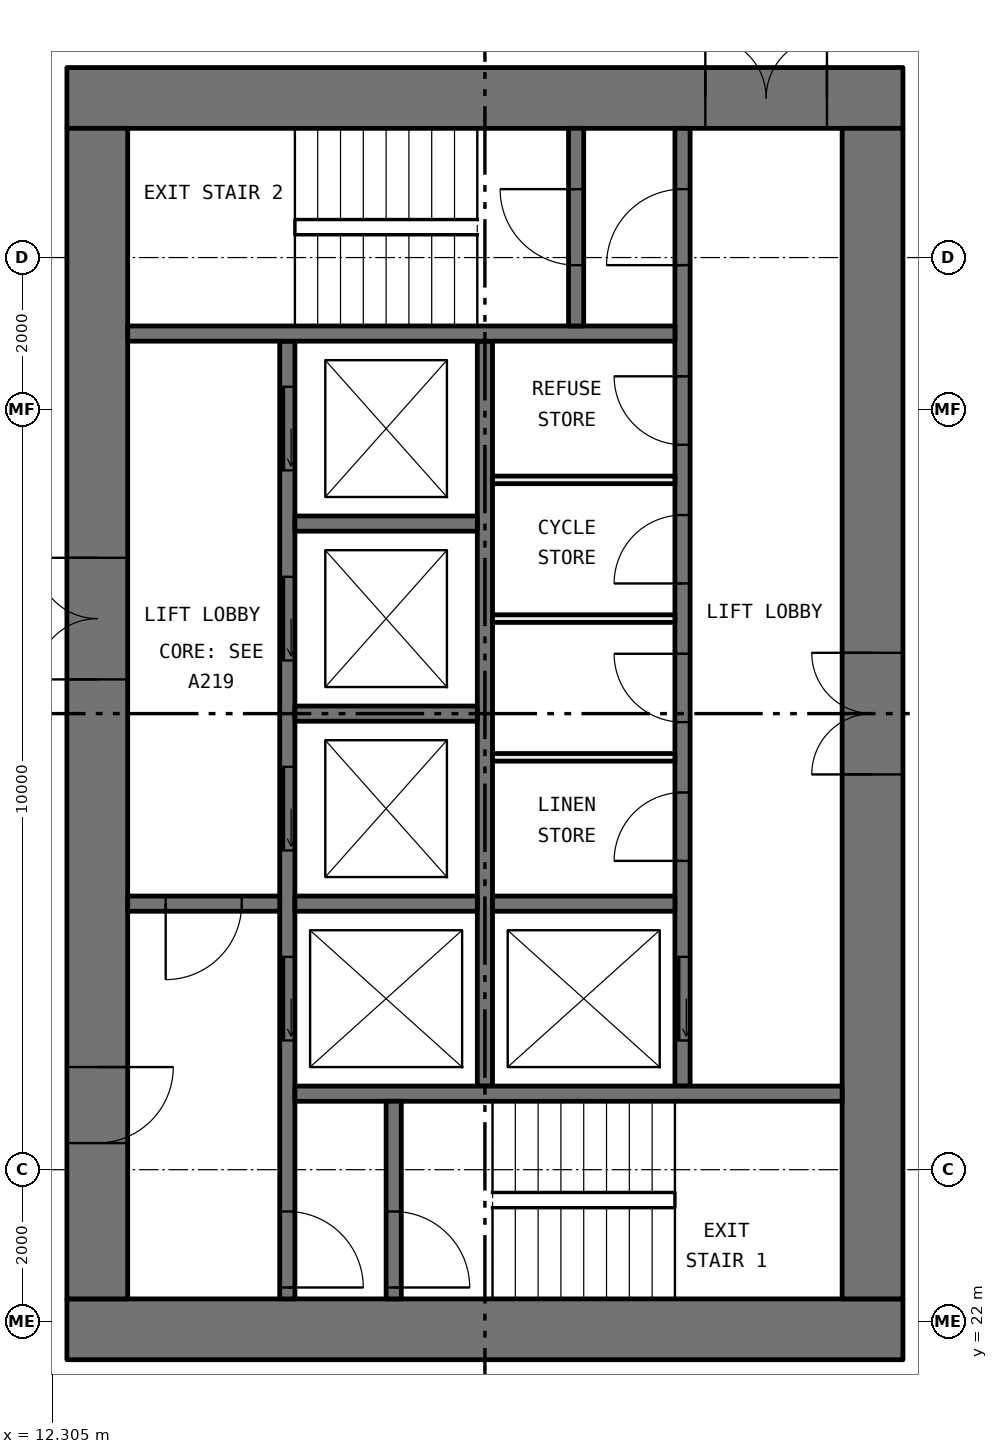
"""IFC4 building model, lengths in metres.
Left out: names, types, materials, properties, quantities, classifications, styles, units other than length and angle.
Written with IfcOpenShell. Run it as: python <this file> out.ifc"""

import sys

from ifc_helpers import new_model, si_unit, direction, frame, frame_2d, origin, place, context, subcontext, project, spatial, rectangle, extrude, element, fill, save


model = new_model("IFC4")
c1 = context("Model", 3, precision=1e-05, world=origin(), true_north=direction((0.0, 1.0)))
c2 = subcontext(c1, "Body", "Model", "MODEL_VIEW")
j1 = project(units=[si_unit("LENGTHUNIT", "METRE"), si_unit("PLANEANGLEUNIT", "RADIAN")], contexts=[c1])
p1 = place(None, origin())
s1 = spatial("IfcSite", under=j1, at=p1, CompositionType="ELEMENT")
p2 = place(p1, origin())
s2 = spatial("IfcBuilding", under=s1, at=p2, CompositionType="ELEMENT")
p3 = place(p2, frame((0.0, 0.0, 74.85)))
s3 = spatial("IfcBuildingStorey", under=s2, at=p3, CompositionType="ELEMENT", Elevation=74.85)
p4 = place(p3, frame((12.5, 21.9, 0.0), z_axis=(0.0, 0.0, 1.0), x_axis=(1.0, 0.0, 0.0)))
e1 = element("IfcWall", 1, at=p4, inside=s3, PredefinedType="SHEAR", context=c2, shape_type="SweptSolid", body=[
    extrude(rectangle(XDim=11.0, YDim=0.8, at=frame_2d((5.5, 0.0))), origin(), (0.0, 0.0, 1.0), 3.05),
])
p5 = place(p3, frame((12.5, 38.1, 0.0), z_axis=(0.0, 0.0, 1.0), x_axis=(1.0, 0.0, 0.0)))
e2 = element("IfcWall", 2, at=p5, inside=s3, PredefinedType="SHEAR", context=c2, shape_type="SweptSolid", body=[
    extrude(rectangle(XDim=11.0, YDim=0.8, at=frame_2d((5.5, 0.0))), origin(), (0.0, 0.0, 1.0), 3.05),
])
p6 = place(p5, frame((8.4, 0.0, 0.0)))
e3 = element("IfcOpeningElement", 3, at=p6, cuts=e2, PredefinedType="OPENING", context=c2, shape_type="SweptSolid", body=[
    extrude(rectangle(XDim=1.6, YDim=2.1, at=frame_2d((0.8, 1.05))), frame((0.0, 0.41, 0.0), z_axis=(0.0, -1.0, 0.0), x_axis=(1.0, 0.0, 0.0)), (0.0, 0.0, 1.0), 0.82),
])
p7 = place(p3, frame((12.9, 22.3, 0.0), z_axis=(0.0, 0.0, 1.0), x_axis=(0.0, 1.0, 0.0)))
e4 = element("IfcWall", 4, at=p7, inside=s3, PredefinedType="SHEAR", context=c2, shape_type="SweptSolid", body=[
    extrude(rectangle(XDim=15.4, YDim=0.8, at=frame_2d((7.7, 0.0))), origin(), (0.0, 0.0, 1.0), 3.05),
])
p8 = place(p7, frame((8.15, 0.0, 0.0)))
e5 = element("IfcOpeningElement", 5, at=p8, cuts=e4, PredefinedType="OPENING", context=c2, shape_type="SweptSolid", body=[
    extrude(rectangle(XDim=1.6, YDim=2.1, at=frame_2d((0.8, 1.05))), frame((0.0, 0.41, 0.0), z_axis=(0.0, -1.0, 0.0), x_axis=(1.0, 0.0, 0.0)), (0.0, 0.0, 1.0), 0.82),
])
p9 = place(p7, frame((2.05, 0.0, 0.0)))
e6 = element("IfcOpeningElement", 6, at=p9, cuts=e4, PredefinedType="OPENING", context=c2, shape_type="SweptSolid", body=[
    extrude(rectangle(XDim=1.0, YDim=2.1, at=frame_2d((0.5, 1.05))), frame((0.0, 0.41, 0.0), z_axis=(0.0, -1.0, 0.0), x_axis=(1.0, 0.0, 0.0)), (0.0, 0.0, 1.0), 0.82),
])
p10 = place(p3, frame((23.1, 22.3, 0.0), z_axis=(0.0, 0.0, 1.0), x_axis=(0.0, 1.0, 0.0)))
e7 = element("IfcWall", 7, at=p10, inside=s3, PredefinedType="SHEAR", context=c2, shape_type="SweptSolid", body=[
    extrude(rectangle(XDim=15.4, YDim=0.8, at=frame_2d((7.7, 0.0))), origin(), (0.0, 0.0, 1.0), 3.05),
])
p11 = place(p10, frame((6.9, 0.0, 0.0)))
e8 = element("IfcOpeningElement", 8, at=p11, cuts=e7, PredefinedType="OPENING", context=c2, shape_type="SweptSolid", body=[
    extrude(rectangle(XDim=1.6, YDim=2.1, at=frame_2d((0.8, 1.05))), frame((0.0, 0.41, 0.0), z_axis=(0.0, -1.0, 0.0), x_axis=(1.0, 0.0, 0.0)), (0.0, 0.0, 1.0), 0.82),
])
p12 = place(p3, frame((15.4, 22.3, 0.0), z_axis=(0.0, 0.0, 1.0), x_axis=(0.0, 1.0, 0.0)))
e9 = element("IfcWall", 9, at=p12, inside=s3, PredefinedType="SOLIDWALL", context=c2, shape_type="SweptSolid", body=[
    extrude(rectangle(XDim=12.6, YDim=0.2, at=frame_2d((6.3, 0.0))), origin(), (0.0, 0.0, 1.0), 3.05),
])
p13 = place(p12, frame((3.4, 0.0, 0.0)))
e10 = element("IfcOpeningElement", 10, at=p13, cuts=e9, PredefinedType="OPENING", context=c2, shape_type="SweptSolid", body=[
    extrude(rectangle(XDim=1.1, YDim=2.1, at=frame_2d((0.55, 1.05))), frame((0.0, 0.11, 0.0), z_axis=(0.0, -1.0, 0.0), x_axis=(1.0, 0.0, 0.0)), (0.0, 0.0, 1.0), 0.22),
])
p14 = place(p12, frame((5.9, 0.0, 0.0)))
e11 = element("IfcOpeningElement", 11, at=p14, cuts=e9, PredefinedType="OPENING", context=c2, shape_type="SweptSolid", body=[
    extrude(rectangle(XDim=1.1, YDim=2.1, at=frame_2d((0.55, 1.05))), frame((0.0, 0.11, 0.0), z_axis=(0.0, -1.0, 0.0), x_axis=(1.0, 0.0, 0.0)), (0.0, 0.0, 1.0), 0.22),
])
p15 = place(p12, frame((8.4, 0.0, 0.0)))
e12 = element("IfcOpeningElement", 12, at=p15, cuts=e9, PredefinedType="OPENING", context=c2, shape_type="SweptSolid", body=[
    extrude(rectangle(XDim=1.1, YDim=2.1, at=frame_2d((0.55, 1.05))), frame((0.0, 0.11, 0.0), z_axis=(0.0, -1.0, 0.0), x_axis=(1.0, 0.0, 0.0)), (0.0, 0.0, 1.0), 0.22),
])
p16 = place(p12, frame((10.9, 0.0, 0.0)))
e13 = element("IfcOpeningElement", 13, at=p16, cuts=e9, PredefinedType="OPENING", context=c2, shape_type="SweptSolid", body=[
    extrude(rectangle(XDim=1.1, YDim=2.1, at=frame_2d((0.55, 1.05))), frame((0.0, 0.11, 0.0), z_axis=(0.0, -1.0, 0.0), x_axis=(1.0, 0.0, 0.0)), (0.0, 0.0, 1.0), 0.22),
])
p17 = place(p12, frame((0.15, 0.0, 0.0)))
e14 = element("IfcOpeningElement", 14, at=p17, cuts=e9, PredefinedType="OPENING", context=c2, shape_type="SweptSolid", body=[
    extrude(rectangle(XDim=1.0, YDim=2.1, at=frame_2d((0.5, 1.05))), frame((0.0, 0.11, 0.0), z_axis=(0.0, -1.0, 0.0), x_axis=(1.0, 0.0, 0.0)), (0.0, 0.0, 1.0), 0.22),
])
p18 = place(p3, frame((20.6, 25.1, 0.0), z_axis=(0.0, 0.0, 1.0), x_axis=(0.0, 1.0, 0.0)))
e15 = element("IfcWall", 15, at=p18, inside=s3, PredefinedType="SOLIDWALL", context=c2, shape_type="SweptSolid", body=[
    extrude(rectangle(XDim=12.6, YDim=0.2, at=frame_2d((6.3, 0.0))), origin(), (0.0, 0.0, 1.0), 3.05),
])
p19 = place(p18, frame((0.6, 0.0, 0.0)))
e16 = element("IfcOpeningElement", 16, at=p19, cuts=e15, PredefinedType="OPENING", context=c2, shape_type="SweptSolid", body=[
    extrude(rectangle(XDim=1.1, YDim=2.1, at=frame_2d((0.55, 1.05))), frame((0.0, 0.11, 0.0), z_axis=(0.0, -1.0, 0.0), x_axis=(1.0, 0.0, 0.0)), (0.0, 0.0, 1.0), 0.22),
])
p20 = place(p18, frame((10.8, 0.0, 0.0)))
e17 = element("IfcOpeningElement", 17, at=p20, cuts=e15, PredefinedType="OPENING", context=c2, shape_type="SweptSolid", body=[
    extrude(rectangle(XDim=1.0, YDim=2.1, at=frame_2d((0.5, 1.05))), frame((0.0, 0.11, 0.0), z_axis=(0.0, -1.0, 0.0), x_axis=(1.0, 0.0, 0.0)), (0.0, 0.0, 1.0), 0.22),
])
p21 = place(p18, frame((2.962, 0.0, 0.0)))
e18 = element("IfcOpeningElement", 18, at=p21, cuts=e15, PredefinedType="OPENING", context=c2, shape_type="SweptSolid", body=[
    extrude(rectangle(XDim=0.9, YDim=2.1, at=frame_2d((0.45, 1.05))), frame((0.0, 0.11, 0.0), z_axis=(0.0, -1.0, 0.0), x_axis=(1.0, 0.0, 0.0)), (0.0, 0.0, 1.0), 0.22),
])
p22 = place(p18, frame((4.788, 0.0, 0.0)))
e19 = element("IfcOpeningElement", 19, at=p22, cuts=e15, PredefinedType="OPENING", context=c2, shape_type="SweptSolid", body=[
    extrude(rectangle(XDim=0.9, YDim=2.1, at=frame_2d((0.45, 1.05))), frame((0.0, 0.11, 0.0), z_axis=(0.0, -1.0, 0.0), x_axis=(1.0, 0.0, 0.0)), (0.0, 0.0, 1.0), 0.22),
])
p23 = place(p18, frame((6.613, 0.0, 0.0)))
e20 = element("IfcOpeningElement", 20, at=p23, cuts=e15, PredefinedType="OPENING", context=c2, shape_type="SweptSolid", body=[
    extrude(rectangle(XDim=0.9, YDim=2.1, at=frame_2d((0.45, 1.05))), frame((0.0, 0.11, 0.0), z_axis=(0.0, -1.0, 0.0), x_axis=(1.0, 0.0, 0.0)), (0.0, 0.0, 1.0), 0.22),
])
p24 = place(p18, frame((8.438, 0.0, 0.0)))
e21 = element("IfcOpeningElement", 21, at=p24, cuts=e15, PredefinedType="OPENING", context=c2, shape_type="SweptSolid", body=[
    extrude(rectangle(XDim=0.9, YDim=2.1, at=frame_2d((0.45, 1.05))), frame((0.0, 0.11, 0.0), z_axis=(0.0, -1.0, 0.0), x_axis=(1.0, 0.0, 0.0)), (0.0, 0.0, 1.0), 0.22),
])
p25 = place(p3, frame((18.0, 25.1, 0.0), z_axis=(0.0, 0.0, 1.0), x_axis=(0.0, 1.0, 0.0)))
e22 = element("IfcWall", 22, at=p25, inside=s3, PredefinedType="SOLIDWALL", context=c2, shape_type="SweptSolid", body=[
    extrude(rectangle(XDim=9.8, YDim=0.2, at=frame_2d((4.9, 0.0))), origin(), (0.0, 0.0, 1.0), 3.05),
])
for number, where, z_axis, x_axis in (
    (23, (15.5, 25.0, 0.0), (0.0, 0.0, 1.0), (1.0, 0.0, 0.0)),
    (24, (13.3, 35.0, 0.0), (0.0, 0.0, 1.0), (1.0, 0.0, 0.0)),
):
    element("IfcWall", number, at=place(p3, frame(where, z_axis=z_axis, x_axis=x_axis)), inside=s3, PredefinedType="SOLIDWALL", context=c2, shape_type="SweptSolid", body=[
        extrude(rectangle(XDim=7.2, YDim=0.2, at=frame_2d((3.6, 0.0))), origin(), (0.0, 0.0, 1.0), 3.05),
    ])
p26 = place(p3, frame((13.3, 27.5, 0.0), z_axis=(0.0, 0.0, 1.0), x_axis=(1.0, 0.0, 0.0)))
e25 = element("IfcWall", 25, at=p26, inside=s3, PredefinedType="SOLIDWALL", context=c2, shape_type="SweptSolid", body=[
    extrude(rectangle(XDim=2.0, YDim=0.2, at=frame_2d((1.0, 0.0))), origin(), (0.0, 0.0, 1.0), 3.05),
])
p27 = place(p26, frame((0.5, 0.0, 0.0)))
e26 = element("IfcOpeningElement", 26, at=p27, cuts=e25, PredefinedType="OPENING", context=c2, shape_type="SweptSolid", body=[
    extrude(rectangle(XDim=1.0, YDim=2.1, at=frame_2d((0.5, 1.05))), frame((0.0, 0.11, 0.0), z_axis=(0.0, -1.0, 0.0), x_axis=(1.0, 0.0, 0.0)), (0.0, 0.0, 1.0), 0.22),
])
p28 = place(p3, frame((16.8, 22.3, 0.0), z_axis=(0.0, 0.0, 1.0), x_axis=(0.0, 1.0, 0.0)))
e27 = element("IfcWall", 27, at=p28, inside=s3, PredefinedType="SOLIDWALL", context=c2, shape_type="SweptSolid", body=[
    extrude(rectangle(XDim=2.6, YDim=0.2, at=frame_2d((1.3, 0.0))), origin(), (0.0, 0.0, 1.0), 3.05),
])
p29 = place(p28, frame((0.15, 0.0, 0.0)))
e28 = element("IfcOpeningElement", 28, at=p29, cuts=e27, PredefinedType="OPENING", context=c2, shape_type="SweptSolid", body=[
    extrude(rectangle(XDim=1.0, YDim=2.1, at=frame_2d((0.5, 1.05))), frame((0.0, 0.11, 0.0), z_axis=(0.0, -1.0, 0.0), x_axis=(1.0, 0.0, 0.0)), (0.0, 0.0, 1.0), 0.22),
])
p30 = place(p3, frame((19.2, 35.1, 0.0), z_axis=(0.0, 0.0, 1.0), x_axis=(0.0, 1.0, 0.0)))
e29 = element("IfcWall", 29, at=p30, inside=s3, PredefinedType="SOLIDWALL", context=c2, shape_type="SweptSolid", body=[
    extrude(rectangle(XDim=2.6, YDim=0.2, at=frame_2d((1.3, 0.0))), origin(), (0.0, 0.0, 1.0), 3.05),
])
p31 = place(p30, frame((0.8, 0.0, 0.0)))
e30 = element("IfcOpeningElement", 30, at=p31, cuts=e29, PredefinedType="OPENING", context=c2, shape_type="SweptSolid", body=[
    extrude(rectangle(XDim=1.0, YDim=2.1, at=frame_2d((0.5, 1.05))), frame((0.0, 0.11, 0.0), z_axis=(0.0, -1.0, 0.0), x_axis=(1.0, 0.0, 0.0)), (0.0, 0.0, 1.0), 0.22),
])
for number, where, z_axis, x_axis in (
    (31, (15.5, 27.5, 0.0), (0.0, 0.0, 1.0), (1.0, 0.0, 0.0)),
    (32, (15.5, 30.0, 0.0), (0.0, 0.0, 1.0), (1.0, 0.0, 0.0)),
    (33, (15.5, 32.5, 0.0), (0.0, 0.0, 1.0), (1.0, 0.0, 0.0)),
    (34, (18.1, 27.5, 0.0), (0.0, 0.0, 1.0), (1.0, 0.0, 0.0)),
):
    element("IfcWall", number, at=place(p3, frame(where, z_axis=z_axis, x_axis=x_axis)), inside=s3, PredefinedType="SOLIDWALL", context=c2, shape_type="SweptSolid", body=[
        extrude(rectangle(XDim=2.4, YDim=0.2, at=frame_2d((1.2, 0.0))), origin(), (0.0, 0.0, 1.0), 3.05),
    ])
for number, where, z_axis, x_axis in (
    (35, (18.1, 29.425, 0.0), (0.0, 0.0, 1.0), (1.0, 0.0, 0.0)),
    (36, (18.1, 31.25, 0.0), (0.0, 0.0, 1.0), (1.0, 0.0, 0.0)),
    (37, (18.1, 33.075, 0.0), (0.0, 0.0, 1.0), (1.0, 0.0, 0.0)),
):
    element("IfcWall", number, at=place(p3, frame(where, z_axis=z_axis, x_axis=x_axis)), inside=s3, PredefinedType="PARTITIONING", context=c2, shape_type="SweptSolid", body=[
        extrude(rectangle(XDim=2.4, YDim=0.1, at=frame_2d((1.2, 0.0))), origin(), (0.0, 0.0, 1.0), 3.05),
    ])
p32 = place(p19, origin())
e38 = element("IfcDoor", 38, at=p32, inside=s3, OperationType="SLIDING_TO_LEFT", PredefinedType="DOOR", context=c2, shape_type="SweptSolid", body=[
    extrude(rectangle(XDim=1.1, YDim=2.1, at=frame_2d((0.55, 1.05))), frame((0.0, 0.025, 0.0), z_axis=(0.0, -1.0, 0.0), x_axis=(1.0, 0.0, 0.0)), (0.0, 0.0, 1.0), 0.05),
])
fill(e16, e38)
p33 = place(p13, origin())
e39 = element("IfcDoor", 39, at=p33, inside=s3, OperationType="SLIDING_TO_LEFT", PredefinedType="DOOR", context=c2, shape_type="SweptSolid", body=[
    extrude(rectangle(XDim=1.1, YDim=2.1, at=frame_2d((0.55, 1.05))), frame((0.0, 0.025, 0.0), z_axis=(0.0, -1.0, 0.0), x_axis=(1.0, 0.0, 0.0)), (0.0, 0.0, 1.0), 0.05),
])
fill(e10, e39)
p34 = place(p14, origin())
e40 = element("IfcDoor", 40, at=p34, inside=s3, OperationType="SLIDING_TO_LEFT", PredefinedType="DOOR", context=c2, shape_type="SweptSolid", body=[
    extrude(rectangle(XDim=1.1, YDim=2.1, at=frame_2d((0.55, 1.05))), frame((0.0, 0.025, 0.0), z_axis=(0.0, -1.0, 0.0), x_axis=(1.0, 0.0, 0.0)), (0.0, 0.0, 1.0), 0.05),
])
fill(e11, e40)
p35 = place(p15, origin())
e41 = element("IfcDoor", 41, at=p35, inside=s3, OperationType="SLIDING_TO_LEFT", PredefinedType="DOOR", context=c2, shape_type="SweptSolid", body=[
    extrude(rectangle(XDim=1.1, YDim=2.1, at=frame_2d((0.55, 1.05))), frame((0.0, 0.025, 0.0), z_axis=(0.0, -1.0, 0.0), x_axis=(1.0, 0.0, 0.0)), (0.0, 0.0, 1.0), 0.05),
])
fill(e12, e41)
p36 = place(p16, origin())
e42 = element("IfcDoor", 42, at=p36, inside=s3, OperationType="SLIDING_TO_LEFT", PredefinedType="DOOR", context=c2, shape_type="SweptSolid", body=[
    extrude(rectangle(XDim=1.1, YDim=2.1, at=frame_2d((0.55, 1.05))), frame((0.0, 0.025, 0.0), z_axis=(0.0, -1.0, 0.0), x_axis=(1.0, 0.0, 0.0)), (0.0, 0.0, 1.0), 0.05),
])
fill(e13, e42)
p37 = place(p29, frame((1.0, 0.0, 0.0), x_axis=(-1.0, 0.0, 0.0)))
e43 = element("IfcDoor", 43, at=p37, inside=s3, OperationType="SINGLE_SWING_LEFT", PredefinedType="DOOR", context=c2, shape_type="SweptSolid", body=[
    extrude(rectangle(XDim=1.0, YDim=2.1, at=frame_2d((0.5, 1.05))), frame((0.0, 0.025, 0.0), z_axis=(0.0, -1.0, 0.0), x_axis=(1.0, 0.0, 0.0)), (0.0, 0.0, 1.0), 0.05),
])
fill(e28, e43)
p38 = place(p17, frame((1.0, 0.0, 0.0), x_axis=(-1.0, 0.0, 0.0)))
e44 = element("IfcDoor", 44, at=p38, inside=s3, OperationType="SINGLE_SWING_LEFT", PredefinedType="DOOR", context=c2, shape_type="SweptSolid", body=[
    extrude(rectangle(XDim=1.0, YDim=2.1, at=frame_2d((0.5, 1.05))), frame((0.0, 0.025, 0.0), z_axis=(0.0, -1.0, 0.0), x_axis=(1.0, 0.0, 0.0)), (0.0, 0.0, 1.0), 0.05),
])
fill(e14, e44)
p39 = place(p20, origin())
e45 = element("IfcDoor", 45, at=p39, inside=s3, OperationType="SINGLE_SWING_RIGHT", PredefinedType="DOOR", context=c2, shape_type="SweptSolid", body=[
    extrude(rectangle(XDim=1.0, YDim=2.1, at=frame_2d((0.5, 1.05))), frame((0.0, 0.025, 0.0), z_axis=(0.0, -1.0, 0.0), x_axis=(1.0, 0.0, 0.0)), (0.0, 0.0, 1.0), 0.05),
])
fill(e17, e45)
p40 = place(p31, origin())
e46 = element("IfcDoor", 46, at=p40, inside=s3, OperationType="SINGLE_SWING_LEFT", PredefinedType="DOOR", context=c2, shape_type="SweptSolid", body=[
    extrude(rectangle(XDim=1.0, YDim=2.1, at=frame_2d((0.5, 1.05))), frame((0.0, 0.025, 0.0), z_axis=(0.0, -1.0, 0.0), x_axis=(1.0, 0.0, 0.0)), (0.0, 0.0, 1.0), 0.05),
])
fill(e30, e46)
p41 = place(p27, frame((1.0, 0.0, 0.0), x_axis=(-1.0, 0.0, 0.0)))
e47 = element("IfcDoor", 47, at=p41, inside=s3, OperationType="SINGLE_SWING_LEFT", PredefinedType="DOOR", context=c2, shape_type="SweptSolid", body=[
    extrude(rectangle(XDim=1.0, YDim=2.1, at=frame_2d((0.5, 1.05))), frame((0.0, 0.025, 0.0), z_axis=(0.0, -1.0, 0.0), x_axis=(1.0, 0.0, 0.0)), (0.0, 0.0, 1.0), 0.05),
])
fill(e26, e47)
p42 = place(p8, origin())
e48 = element("IfcDoor", 48, at=p42, inside=s3, OperationType="DOUBLE_DOOR_SINGLE_SWING", PredefinedType="DOOR", context=c2, shape_type="SweptSolid", body=[
    extrude(rectangle(XDim=1.6, YDim=2.1, at=frame_2d((0.8, 1.05))), frame((0.0, 0.025, 0.0), z_axis=(0.0, -1.0, 0.0), x_axis=(1.0, 0.0, 0.0)), (0.0, 0.0, 1.0), 0.05),
])
fill(e5, e48)
p43 = place(p9, frame((1.0, 0.0, 0.0), x_axis=(-1.0, 0.0, 0.0)))
e49 = element("IfcDoor", 49, at=p43, inside=s3, OperationType="SINGLE_SWING_RIGHT", PredefinedType="DOOR", context=c2, shape_type="SweptSolid", body=[
    extrude(rectangle(XDim=1.0, YDim=2.1, at=frame_2d((0.5, 1.05))), frame((0.0, 0.025, 0.0), z_axis=(0.0, -1.0, 0.0), x_axis=(1.0, 0.0, 0.0)), (0.0, 0.0, 1.0), 0.05),
])
fill(e6, e49)
p44 = place(p6, origin())
e50 = element("IfcDoor", 50, at=p44, inside=s3, OperationType="DOUBLE_DOOR_SINGLE_SWING", PredefinedType="DOOR", context=c2, shape_type="SweptSolid", body=[
    extrude(rectangle(XDim=1.6, YDim=2.1, at=frame_2d((0.8, 1.05))), frame((0.0, 0.025, 0.0), z_axis=(0.0, -1.0, 0.0), x_axis=(1.0, 0.0, 0.0)), (0.0, 0.0, 1.0), 0.05),
])
fill(e3, e50)
p45 = place(p11, origin())
e51 = element("IfcDoor", 51, at=p45, inside=s3, OperationType="DOUBLE_DOOR_SINGLE_SWING", PredefinedType="DOOR", context=c2, shape_type="SweptSolid", body=[
    extrude(rectangle(XDim=1.6, YDim=2.1, at=frame_2d((0.8, 1.05))), frame((0.0, 0.025, 0.0), z_axis=(0.0, -1.0, 0.0), x_axis=(1.0, 0.0, 0.0)), (0.0, 0.0, 1.0), 0.05),
])
fill(e8, e51)
p46 = place(p21, origin())
e52 = element("IfcDoor", 52, at=p46, inside=s3, OperationType="SINGLE_SWING_RIGHT", PredefinedType="DOOR", context=c2, shape_type="SweptSolid", body=[
    extrude(rectangle(XDim=0.9, YDim=2.1, at=frame_2d((0.45, 1.05))), frame((0.0, 0.025, 0.0), z_axis=(0.0, -1.0, 0.0), x_axis=(1.0, 0.0, 0.0)), (0.0, 0.0, 1.0), 0.05),
])
fill(e18, e52)
p47 = place(p22, origin())
e53 = element("IfcDoor", 53, at=p47, inside=s3, OperationType="SINGLE_SWING_LEFT", PredefinedType="DOOR", context=c2, shape_type="SweptSolid", body=[
    extrude(rectangle(XDim=0.9, YDim=2.1, at=frame_2d((0.45, 1.05))), frame((0.0, 0.025, 0.0), z_axis=(0.0, -1.0, 0.0), x_axis=(1.0, 0.0, 0.0)), (0.0, 0.0, 1.0), 0.05),
])
fill(e19, e53)
p48 = place(p23, origin())
e54 = element("IfcDoor", 54, at=p48, inside=s3, OperationType="SINGLE_SWING_RIGHT", PredefinedType="DOOR", context=c2, shape_type="SweptSolid", body=[
    extrude(rectangle(XDim=0.9, YDim=2.1, at=frame_2d((0.45, 1.05))), frame((0.0, 0.025, 0.0), z_axis=(0.0, -1.0, 0.0), x_axis=(1.0, 0.0, 0.0)), (0.0, 0.0, 1.0), 0.05),
])
fill(e20, e54)
p49 = place(p24, origin())
e55 = element("IfcDoor", 55, at=p49, inside=s3, OperationType="SINGLE_SWING_LEFT", PredefinedType="DOOR", context=c2, shape_type="SweptSolid", body=[
    extrude(rectangle(XDim=0.9, YDim=2.1, at=frame_2d((0.45, 1.05))), frame((0.0, 0.025, 0.0), z_axis=(0.0, -1.0, 0.0), x_axis=(1.0, 0.0, 0.0)), (0.0, 0.0, 1.0), 0.05),
])
fill(e21, e55)
save(model, sys.argv[1])
